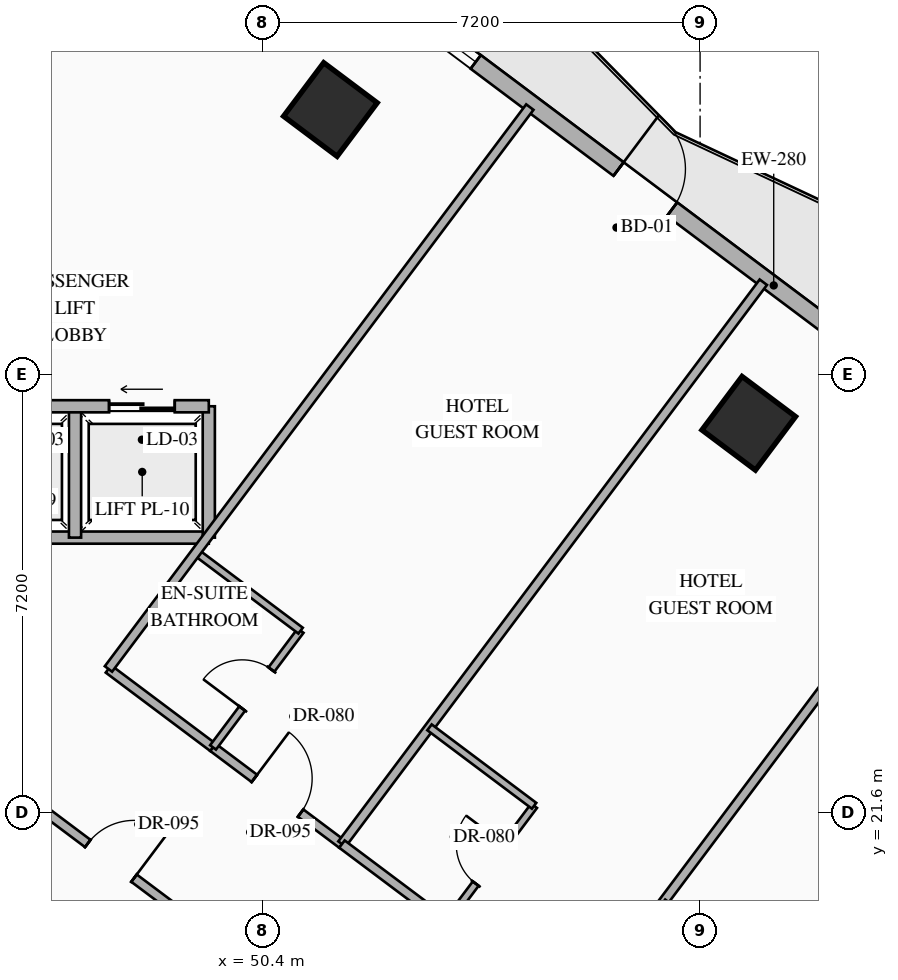
"""IFC4 building model, lengths in metres.
Left out: names, types, materials, properties, quantities, classifications, styles, units other than length and angle.
Written with IfcOpenShell. Run it as: python <this file> out.ifc"""

import sys

from ifc_helpers import new_model, si_unit, direction, frame, frame_2d, origin, origin_2d, place, context, subcontext, project, spatial, rectangle, hollow_rectangle, extrude, element, fill, save


model = new_model("IFC4")
c1 = context("Model", 3, precision=1e-05, world=origin(), true_north=direction((0.0, 1.0)))
c2 = subcontext(c1, "Body", "Model", "MODEL_VIEW")
j1 = project(units=[si_unit("LENGTHUNIT", "METRE"), si_unit("PLANEANGLEUNIT", "RADIAN")], contexts=[c1])
p1 = place(None, origin())
s1 = spatial("IfcSite", under=j1, at=p1, CompositionType="ELEMENT")
p2 = place(p1, origin())
s2 = spatial("IfcBuilding", under=s1, at=p2, CompositionType="ELEMENT")
p3 = place(p2, frame((0.0, 0.0, 43.3)))
s3 = spatial("IfcBuildingStorey", under=s2, at=p3, CompositionType="ELEMENT", Elevation=43.3)
for number, where, z_axis, x_axis in (
    (1, (51.52, 33.16, 0.0), (0.0, 0.0, 1.0), (0.8, -0.6, 0.0)),
    (2, (58.4, 28.0, 0.0), (0.0, 0.0, 1.0), (0.8, -0.6, 0.0)),
):
    element("IfcColumn", number, at=place(p3, frame(where, z_axis=z_axis, x_axis=x_axis)), inside=s3, PredefinedType="COLUMN", context=c2, shape_type="SweptSolid", body=[
        extrude(hollow_rectangle(XDim=1.1, YDim=1.1, WallThickness=0.04, at=origin_2d()), origin(), (0.0, 0.0, 1.0), 3.35),
    ])
p4 = place(p3, frame((44.86, 40.73, 0.0), z_axis=(0.0, 0.0, 1.0), x_axis=(0.800006902154, -0.599990797017, 0.0)))
e3 = element("IfcWall", 3, at=p4, inside=s3, PredefinedType="STANDARD", context=c2, shape_type="SweptSolid", body=[
    extrude(rectangle(XDim=29.712, YDim=0.28, at=frame_2d((14.856, 0.0))), origin(), (0.0, 0.0, 1.0), 3.13),
])
p5 = place(p4, frame((14.249, 0.0, 0.0)))
e4 = element("IfcOpeningElement", 4, at=p5, cuts=e3, PredefinedType="OPENING", context=c2, shape_type="SweptSolid", body=[
    extrude(rectangle(XDim=1.1, YDim=2.2, at=frame_2d((0.55, 1.1))), frame((0.0, 0.15, 0.0), z_axis=(0.0, -1.0, 0.0), x_axis=(1.0, 0.0, 0.0)), (0.0, 0.0, 1.0), 0.3),
])
p6 = place(p4, frame((1.612, 0.0, 0.85)))
e5 = element("IfcOpeningElement", 5, at=p6, cuts=e3, PredefinedType="OPENING", context=c2, shape_type="SweptSolid", body=[
    extrude(rectangle(XDim=1.4, YDim=1.8, at=frame_2d((0.7, 0.9))), frame((0.0, 0.15, 0.0), z_axis=(0.0, -1.0, 0.0), x_axis=(1.0, 0.0, 0.0)), (0.0, 0.0, 1.0), 0.3),
])
p7 = place(p4, frame((5.667, 0.0, 0.85)))
e6 = element("IfcOpeningElement", 6, at=p7, cuts=e3, PredefinedType="OPENING", context=c2, shape_type="SweptSolid", body=[
    extrude(rectangle(XDim=1.4, YDim=1.8, at=frame_2d((0.7, 0.9))), frame((0.0, 0.15, 0.0), z_axis=(0.0, -1.0, 0.0), x_axis=(1.0, 0.0, 0.0)), (0.0, 0.0, 1.0), 0.3),
])
p8 = place(p4, frame((9.912, 0.0, 0.85)))
e7 = element("IfcOpeningElement", 7, at=p8, cuts=e3, PredefinedType="OPENING", context=c2, shape_type="SweptSolid", body=[
    extrude(rectangle(XDim=1.4, YDim=1.8, at=frame_2d((0.7, 0.9))), frame((0.0, 0.15, 0.0), z_axis=(0.0, -1.0, 0.0), x_axis=(1.0, 0.0, 0.0)), (0.0, 0.0, 1.0), 0.3),
])
p9 = place(p4, frame((19.528, 0.0, 0.85)))
e8 = element("IfcOpeningElement", 8, at=p9, cuts=e3, PredefinedType="OPENING", context=c2, shape_type="SweptSolid", body=[
    extrude(rectangle(XDim=1.4, YDim=1.8, at=frame_2d((0.7, 0.9))), frame((0.0, 0.15, 0.0), z_axis=(0.0, -1.0, 0.0), x_axis=(1.0, 0.0, 0.0)), (0.0, 0.0, 1.0), 0.3),
])
p10 = place(p4, frame((23.451, 0.0, 0.85)))
e9 = element("IfcOpeningElement", 9, at=p10, cuts=e3, PredefinedType="OPENING", context=c2, shape_type="SweptSolid", body=[
    extrude(rectangle(XDim=1.4, YDim=1.8, at=frame_2d((0.7, 0.9))), frame((0.0, 0.15, 0.0), z_axis=(0.0, -1.0, 0.0), x_axis=(1.0, 0.0, 0.0)), (0.0, 0.0, 1.0), 0.3),
])
p11 = place(p4, frame((27.852, 0.0, 0.85)))
e10 = element("IfcOpeningElement", 10, at=p11, cuts=e3, PredefinedType="OPENING", context=c2, shape_type="SweptSolid", body=[
    extrude(rectangle(XDim=1.4, YDim=1.8, at=frame_2d((0.7, 0.9))), frame((0.0, 0.15, 0.0), z_axis=(0.0, -1.0, 0.0), x_axis=(1.0, 0.0, 0.0)), (0.0, 0.0, 1.0), 0.3),
])
p12 = place(p3, frame((53.318, 2.487, 0.0), z_axis=(0.0, 0.0, 1.0), x_axis=(-0.800004174678, 0.599994433723, 0.0)))
e11 = element("IfcWall", 11, at=p12, inside=s3, PredefinedType="STANDARD", context=c2, shape_type="SweptSolid", body=[
    extrude(rectangle(XDim=35.089, YDim=0.28, at=frame_2d((17.544, 0.0))), origin(), (0.0, 0.0, 1.0), 3.13),
])
p13 = place(p12, frame((1.931, 0.0, 0.85)))
e12 = element("IfcOpeningElement", 12, at=p13, cuts=e11, PredefinedType="OPENING", context=c2, shape_type="SweptSolid", body=[
    extrude(rectangle(XDim=1.4, YDim=1.8, at=frame_2d((0.7, 0.9))), frame((0.0, 0.15, 0.0), z_axis=(0.0, -1.0, 0.0), x_axis=(1.0, 0.0, 0.0)), (0.0, 0.0, 1.0), 0.3),
])
p14 = place(p12, frame((6.819, 0.0, 0.85)))
e13 = element("IfcOpeningElement", 13, at=p14, cuts=e11, PredefinedType="OPENING", context=c2, shape_type="SweptSolid", body=[
    extrude(rectangle(XDim=1.4, YDim=1.8, at=frame_2d((0.7, 0.9))), frame((0.0, 0.15, 0.0), z_axis=(0.0, -1.0, 0.0), x_axis=(1.0, 0.0, 0.0)), (0.0, 0.0, 1.0), 0.3),
])
p15 = place(p12, frame((11.832, 0.0, 0.85)))
e14 = element("IfcOpeningElement", 14, at=p15, cuts=e11, PredefinedType="OPENING", context=c2, shape_type="SweptSolid", body=[
    extrude(rectangle(XDim=1.4, YDim=1.8, at=frame_2d((0.7, 0.9))), frame((0.0, 0.15, 0.0), z_axis=(0.0, -1.0, 0.0), x_axis=(1.0, 0.0, 0.0)), (0.0, 0.0, 1.0), 0.3),
])
p16 = place(p12, frame((17.647, 0.0, 0.85)))
e15 = element("IfcOpeningElement", 15, at=p16, cuts=e11, PredefinedType="OPENING", context=c2, shape_type="SweptSolid", body=[
    extrude(rectangle(XDim=1.4, YDim=1.8, at=frame_2d((0.7, 0.9))), frame((0.0, 0.15, 0.0), z_axis=(0.0, -1.0, 0.0), x_axis=(1.0, 0.0, 0.0)), (0.0, 0.0, 1.0), 0.3),
])
p17 = place(p12, frame((21.857, 0.0, 0.85)))
e16 = element("IfcOpeningElement", 16, at=p17, cuts=e11, PredefinedType="OPENING", context=c2, shape_type="SweptSolid", body=[
    extrude(rectangle(XDim=1.4, YDim=1.8, at=frame_2d((0.7, 0.9))), frame((0.0, 0.15, 0.0), z_axis=(0.0, -1.0, 0.0), x_axis=(1.0, 0.0, 0.0)), (0.0, 0.0, 1.0), 0.3),
])
p18 = place(p12, frame((26.87, 0.0, 0.85)))
e17 = element("IfcOpeningElement", 17, at=p18, cuts=e11, PredefinedType="OPENING", context=c2, shape_type="SweptSolid", body=[
    extrude(rectangle(XDim=1.4, YDim=1.8, at=frame_2d((0.7, 0.9))), frame((0.0, 0.15, 0.0), z_axis=(0.0, -1.0, 0.0), x_axis=(1.0, 0.0, 0.0)), (0.0, 0.0, 1.0), 0.3),
])
p19 = place(p12, frame((31.757, 0.0, 0.85)))
e18 = element("IfcOpeningElement", 18, at=p19, cuts=e11, PredefinedType="OPENING", context=c2, shape_type="SweptSolid", body=[
    extrude(rectangle(XDim=1.4, YDim=1.8, at=frame_2d((0.7, 0.9))), frame((0.0, 0.15, 0.0), z_axis=(0.0, -1.0, 0.0), x_axis=(1.0, 0.0, 0.0)), (0.0, 0.0, 1.0), 0.3),
])
p20 = place(p3, frame((45.12, 26.12, 0.0), z_axis=(0.0, 0.0, 1.0), x_axis=(1.0, 0.0, 0.0)))
e19 = element("IfcWall", 19, at=p20, inside=s3, PredefinedType="STANDARD", context=c2, shape_type="SweptSolid", body=[
    extrude(rectangle(XDim=4.4, YDim=0.2, at=frame_2d((2.2, 0.0))), origin(), (0.0, 0.0, 1.0), 3.13),
])
for number, where, z_axis, x_axis in (
    (20, (49.52, 26.12, 0.0), (0.0, 0.0, 1.0), (0.0, 1.0, 0.0)),
    (21, (47.32, 26.12, 0.0), (0.0, 0.0, 1.0), (0.0, 1.0, 0.0)),
):
    element("IfcWall", number, at=place(p3, frame(where, z_axis=z_axis, x_axis=x_axis)), inside=s3, PredefinedType="STANDARD", context=c2, shape_type="SweptSolid", body=[
        extrude(rectangle(XDim=2.16, YDim=0.2, at=frame_2d((1.08, 0.0))), origin(), (0.0, 0.0, 1.0), 3.13),
    ])
p21 = place(p3, frame((45.12, 28.28, 0.0), z_axis=(0.0, 0.0, 1.0), x_axis=(1.0, 0.0, 0.0)))
e22 = element("IfcWall", 22, at=p21, inside=s3, PredefinedType="STANDARD", context=c2, shape_type="SweptSolid", body=[
    extrude(rectangle(XDim=4.4, YDim=0.2, at=frame_2d((2.2, 0.0))), origin(), (0.0, 0.0, 1.0), 3.13),
])
p22 = place(p21, frame((0.56, 0.0, 0.0)))
e23 = element("IfcOpeningElement", 23, at=p22, cuts=e22, PredefinedType="OPENING", context=c2, shape_type="SweptSolid", body=[
    extrude(rectangle(XDim=1.08, YDim=2.15, at=frame_2d((0.54, 1.075))), frame((0.0, 0.11, 0.0), z_axis=(0.0, -1.0, 0.0), x_axis=(1.0, 0.0, 0.0)), (0.0, 0.0, 1.0), 0.22),
])
p23 = place(p21, frame((2.76, 0.0, 0.0)))
e24 = element("IfcOpeningElement", 24, at=p23, cuts=e22, PredefinedType="OPENING", context=c2, shape_type="SweptSolid", body=[
    extrude(rectangle(XDim=1.08, YDim=2.15, at=frame_2d((0.54, 1.075))), frame((0.0, 0.11, 0.0), z_axis=(0.0, -1.0, 0.0), x_axis=(1.0, 0.0, 0.0)), (0.0, 0.0, 1.0), 0.22),
])
p24 = place(p3, frame((47.87, 23.96, 0.0), z_axis=(0.0, 0.0, 1.0), x_axis=(0.79998637334, -0.60001816845, 0.0)))
e25 = element("IfcWall", 25, at=p24, inside=s3, PredefinedType="PARTITIONING", context=c2, shape_type="SweptSolid", body=[
    extrude(rectangle(XDim=2.15, YDim=0.15, at=frame_2d((1.075, 0.0))), origin(), (0.0, 0.0, 1.0), 2.775),
])
p25 = place(p3, frame((49.59, 22.67, 0.0), z_axis=(0.0, 0.0, 1.0), x_axis=(0.800011056104, -0.599985258246, 0.0)))
e26 = element("IfcWall", 26, at=p25, inside=s3, PredefinedType="PARTITIONING", context=c2, shape_type="SweptSolid", body=[
    extrude(rectangle(XDim=2.65, YDim=0.15, at=frame_2d((1.325, 0.0))), origin(), (0.0, 0.0, 1.0), 2.775),
])
p26 = place(p25, frame((0.85, 0.0, 0.0)))
e27 = element("IfcOpeningElement", 27, at=p26, cuts=e26, PredefinedType="OPENING", context=c2, shape_type="SweptSolid", body=[
    extrude(rectangle(XDim=0.95, YDim=2.15, at=frame_2d((0.475, 1.075))), frame((0.0, 0.085, 0.0), z_axis=(0.0, -1.0, 0.0), x_axis=(1.0, 0.0, 0.0)), (0.0, 0.0, 1.0), 0.17),
])
p27 = place(p3, frame((49.59, 22.67, 0.0), z_axis=(0.0, 0.0, 1.0), x_axis=(0.599951172744, 0.800036618114, 0.0)))
e28 = element("IfcWall", 28, at=p27, inside=s3, PredefinedType="PARTITIONING", context=c2, shape_type="SweptSolid", body=[
    extrude(rectangle(XDim=2.4, YDim=0.12, at=frame_2d((1.2, 0.0))), origin(), (0.0, 0.0, 1.0), 3.13),
])
p28 = place(p27, frame((0.8, 0.0, 0.0)))
e29 = element("IfcOpeningElement", 29, at=p28, cuts=e28, PredefinedType="OPENING", context=c2, shape_type="SweptSolid", body=[
    extrude(rectangle(XDim=0.8, YDim=2.06, at=frame_2d((0.4, 1.03))), frame((0.0, 0.07, 0.0), z_axis=(0.0, -1.0, 0.0), x_axis=(1.0, 0.0, 0.0)), (0.0, 0.0, 1.0), 0.14),
])
p29 = place(p3, frame((49.31, 25.88, 0.0), z_axis=(0.0, 0.0, 1.0), x_axis=(0.800040880289, -0.59994548908, 0.0)))
e30 = element("IfcWall", 30, at=p29, inside=s3, PredefinedType="PARTITIONING", context=c2, shape_type="SweptSolid", body=[
    extrude(rectangle(XDim=2.15, YDim=0.12, at=frame_2d((1.075, 0.0))), origin(), (0.0, 0.0, 1.0), 3.13),
])
for number, where, z_axis, x_axis in (
    (31, (47.87, 23.96, 0.0), (0.0, 0.0, 1.0), (0.6, 0.8, 0.0)),
    (32, (51.71, 21.08, 0.0), (0.0, 0.0, 1.0), (0.6, 0.8, 0.0)),
):
    element("IfcWall", number, at=place(p3, frame(where, z_axis=z_axis, x_axis=x_axis)), inside=s3, PredefinedType="PARTITIONING", context=c2, shape_type="SweptSolid", body=[
        extrude(rectangle(XDim=11.55, YDim=0.15, at=frame_2d((5.775, 0.0))), origin(), (0.0, 0.0, 1.0), 3.13),
    ])
p30 = place(p3, frame((51.71, 21.08, 0.0), z_axis=(0.0, 0.0, 1.0), x_axis=(0.79998637334, -0.60001816845, 0.0)))
e33 = element("IfcWall", 33, at=p30, inside=s3, PredefinedType="PARTITIONING", context=c2, shape_type="SweptSolid", body=[
    extrude(rectangle(XDim=2.15, YDim=0.15, at=frame_2d((1.075, 0.0))), origin(), (0.0, 0.0, 1.0), 2.775),
])
p31 = place(p3, frame((53.43, 19.79, 0.0), z_axis=(0.0, 0.0, 1.0), x_axis=(0.600065100855, 0.79995117022, 0.0)))
e34 = element("IfcWall", 34, at=p31, inside=s3, PredefinedType="PARTITIONING", context=c2, shape_type="SweptSolid", body=[
    extrude(rectangle(XDim=2.4, YDim=0.12, at=frame_2d((1.2, 0.0))), origin(), (0.0, 0.0, 1.0), 3.13),
])
p32 = place(p31, frame((0.8, 0.0, 0.0)))
e35 = element("IfcOpeningElement", 35, at=p32, cuts=e34, PredefinedType="OPENING", context=c2, shape_type="SweptSolid", body=[
    extrude(rectangle(XDim=0.8, YDim=2.06, at=frame_2d((0.4, 1.03))), frame((0.0, 0.07, 0.0), z_axis=(0.0, -1.0, 0.0), x_axis=(1.0, 0.0, 0.0)), (0.0, 0.0, 1.0), 0.14),
])
p33 = place(p3, frame((53.15, 23.0, 0.0), z_axis=(0.0, 0.0, 1.0), x_axis=(0.800027249606, -0.599963665473, 0.0)))
e36 = element("IfcWall", 36, at=p33, inside=s3, PredefinedType="PARTITIONING", context=c2, shape_type="SweptSolid", body=[
    extrude(rectangle(XDim=2.15, YDim=0.12, at=frame_2d((1.075, 0.0))), origin(), (0.0, 0.0, 1.0), 3.13),
])
p34 = place(p3, frame((55.55, 18.2, 0.0), z_axis=(0.0, 0.0, 1.0), x_axis=(0.599996617946, 0.80000253653, 0.0)))
e37 = element("IfcWall", 37, at=p34, inside=s3, PredefinedType="PARTITIONING", context=c2, shape_type="SweptSolid", body=[
    extrude(rectangle(XDim=11.55, YDim=0.15, at=frame_2d((5.775, 0.0))), origin(), (0.0, 0.0, 1.0), 3.13),
])
p35 = place(p3, frame((56.99, 20.12, 0.0), z_axis=(0.0, 0.0, 1.0), x_axis=(0.79998637334, -0.60001816845, 0.0)))
e38 = element("IfcWall", 38, at=p35, inside=s3, PredefinedType="PARTITIONING", context=c2, shape_type="SweptSolid", body=[
    extrude(rectangle(XDim=2.15, YDim=0.12, at=frame_2d((1.075, 0.0))), origin(), (0.0, 0.0, 1.0), 3.13),
])
p36 = place(p3, frame((59.55, 15.2, 0.0), z_axis=(0.0, 0.0, 1.0), x_axis=(0.599996617946, 0.80000253653, 0.0)))
e39 = element("IfcWall", 39, at=p36, inside=s3, PredefinedType="PARTITIONING", context=c2, shape_type="SweptSolid", body=[
    extrude(rectangle(XDim=11.55, YDim=0.15, at=frame_2d((5.775, 0.0))), origin(), (0.0, 0.0, 1.0), 3.13),
])
p37 = place(p3, frame((46.37, 21.96, 0.0), z_axis=(0.0, 0.0, 1.0), x_axis=(0.799977170108, -0.600030438649, 0.0)))
e40 = element("IfcWall", 40, at=p37, inside=s3, PredefinedType="PARTITIONING", context=c2, shape_type="SweptSolid", body=[
    extrude(rectangle(XDim=3.85, YDim=0.15, at=frame_2d((1.925, 0.0))), origin(), (0.0, 0.0, 1.0), 2.425),
])
p38 = place(p37, frame((1.45, 0.0, 0.0)))
e41 = element("IfcOpeningElement", 41, at=p38, cuts=e40, PredefinedType="OPENING", context=c2, shape_type="SweptSolid", body=[
    extrude(rectangle(XDim=0.95, YDim=2.15, at=frame_2d((0.475, 1.075))), frame((0.0, 0.085, 0.0), z_axis=(0.0, -1.0, 0.0), x_axis=(1.0, 0.0, 0.0)), (0.0, 0.0, 1.0), 0.17),
])
p39 = place(p5, origin())
e42 = element("IfcDoor", 42, at=p39, inside=s3, OperationType="SINGLE_SWING_LEFT", PredefinedType="DOOR", context=c2, shape_type="SweptSolid", body=[
    extrude(rectangle(XDim=1.1, YDim=2.2, at=frame_2d((0.55, 1.1))), frame((0.0, 0.025, 0.0), z_axis=(0.0, -1.0, 0.0), x_axis=(1.0, 0.0, 0.0)), (0.0, 0.0, 1.0), 0.05),
])
fill(e4, e42)
p40 = place(p8, origin())
e43 = element("IfcWindow", 43, at=p40, inside=s3, PartitioningType="SINGLE_PANEL", PredefinedType="WINDOW", context=c2, shape_type="SweptSolid", body=[
    extrude(rectangle(XDim=1.4, YDim=1.8, at=frame_2d((0.7, 0.9))), frame((0.0, 0.03, 0.0), z_axis=(0.0, -1.0, 0.0), x_axis=(1.0, 0.0, 0.0)), (0.0, 0.0, 1.0), 0.06),
])
fill(e7, e43)
p41 = place(p23, origin())
e44 = element("IfcDoor", 44, at=p41, inside=s3, OperationType="SLIDING_TO_LEFT", PredefinedType="USERDEFINED", context=c2, shape_type="SweptSolid", body=[
    extrude(rectangle(XDim=1.08, YDim=2.15, at=frame_2d((0.54, 1.075))), frame((0.0, 0.025, 0.0), z_axis=(0.0, -1.0, 0.0), x_axis=(1.0, 0.0, 0.0)), (0.0, 0.0, 1.0), 0.05),
])
fill(e24, e44)
p42 = place(p26, origin())
e45 = element("IfcDoor", 45, at=p42, inside=s3, OperationType="SINGLE_SWING_LEFT", PredefinedType="DOOR", context=c2, shape_type="SweptSolid", body=[
    extrude(rectangle(XDim=0.95, YDim=2.15, at=frame_2d((0.475, 1.075))), frame((0.0, 0.025, 0.0), z_axis=(0.0, -1.0, 0.0), x_axis=(1.0, 0.0, 0.0)), (0.0, 0.0, 1.0), 0.05),
])
fill(e27, e45)
p43 = place(p28, origin())
e46 = element("IfcDoor", 46, at=p43, inside=s3, OperationType="SINGLE_SWING_LEFT", PredefinedType="DOOR", context=c2, shape_type="SweptSolid", body=[
    extrude(rectangle(XDim=0.8, YDim=2.06, at=frame_2d((0.4, 1.03))), frame((0.0, 0.025, 0.0), z_axis=(0.0, -1.0, 0.0), x_axis=(1.0, 0.0, 0.0)), (0.0, 0.0, 1.0), 0.05),
])
fill(e29, e46)
p44 = place(p32, origin())
e47 = element("IfcDoor", 47, at=p44, inside=s3, OperationType="SINGLE_SWING_RIGHT", PredefinedType="DOOR", context=c2, shape_type="SweptSolid", body=[
    extrude(rectangle(XDim=0.8, YDim=2.06, at=frame_2d((0.4, 1.03))), frame((0.0, 0.025, 0.0), z_axis=(0.0, -1.0, 0.0), x_axis=(1.0, 0.0, 0.0)), (0.0, 0.0, 1.0), 0.05),
])
fill(e35, e47)
p45 = place(p38, origin())
e48 = element("IfcDoor", 48, at=p45, inside=s3, OperationType="SINGLE_SWING_RIGHT", PredefinedType="DOOR", context=c2, shape_type="SweptSolid", body=[
    extrude(rectangle(XDim=0.95, YDim=2.15, at=frame_2d((0.475, 1.075))), frame((0.0, 0.025, 0.0), z_axis=(0.0, -1.0, 0.0), x_axis=(1.0, 0.0, 0.0)), (0.0, 0.0, 1.0), 0.05),
])
fill(e41, e48)
save(model, sys.argv[1])
